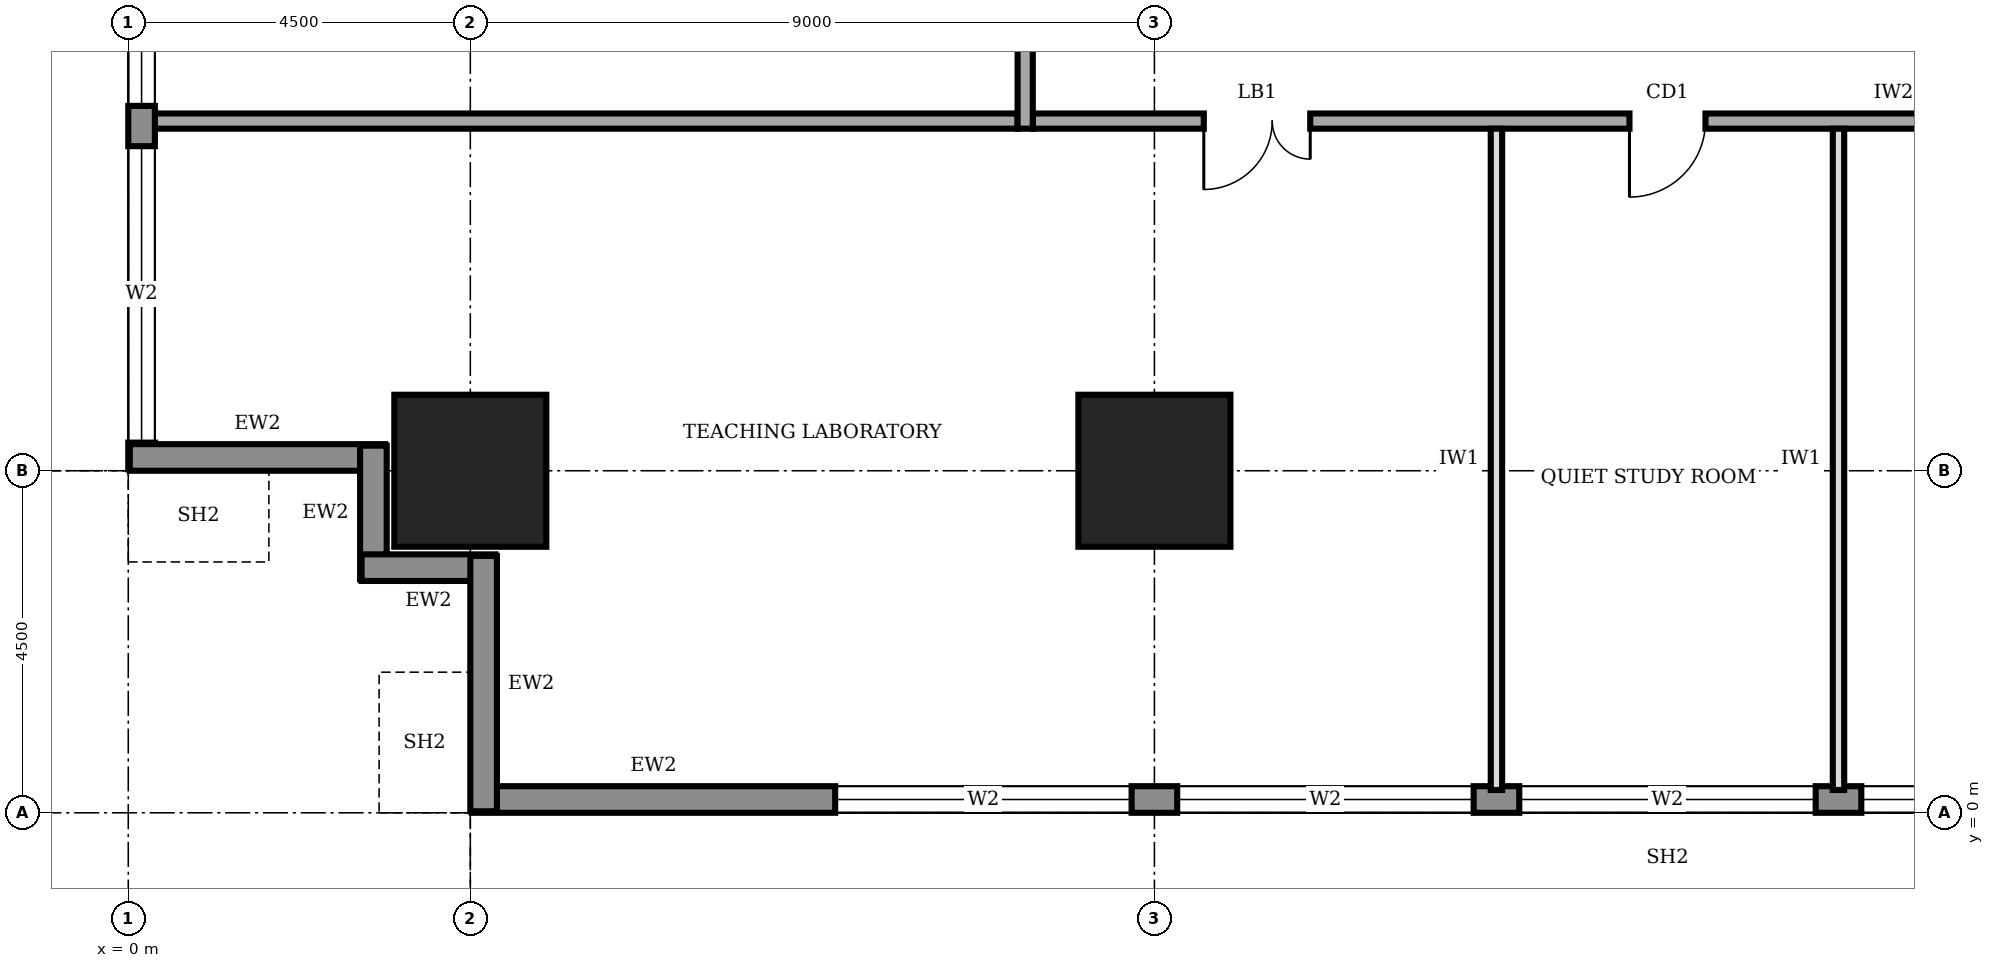
"""IFC4 building model, lengths in metres.
Left out: names, types, materials, properties, quantities, classifications, styles, units other than length and angle.
Written with IfcOpenShell. Run it as: python <this file> out.ifc"""

import sys

from ifc_helpers import new_model, si_unit, direction, frame, frame_2d, origin, origin_2d, place, context, subcontext, project, spatial, rectangle, extrude, element, fill, save


model = new_model("IFC4")
c1 = context("Model", 3, precision=1e-05, world=origin(), true_north=direction((0.0, 1.0)))
c2 = subcontext(c1, "Body", "Model", "MODEL_VIEW")
j1 = project(units=[si_unit("LENGTHUNIT", "METRE"), si_unit("PLANEANGLEUNIT", "RADIAN")], contexts=[c1])
p1 = place(None, origin())
s1 = spatial("IfcSite", under=j1, at=p1, CompositionType="ELEMENT")
p2 = place(p1, origin())
s2 = spatial("IfcBuilding", under=s1, at=p2, CompositionType="ELEMENT")
p3 = place(p2, frame((0.0, 0.0, 69.0)))
s3 = spatial("IfcBuildingStorey", under=s2, at=p3, CompositionType="ELEMENT", Elevation=69.0)
for number, where, z_axis, x_axis in (
    (1, (4.5, 4.5, 0.0), (0.0, 0.0, 1.0), (1.0, 0.0, 0.0)),
    (2, (13.5, 4.5, 0.0), (0.0, 0.0, 1.0), (1.0, 0.0, 0.0)),
):
    element("IfcColumn", number, at=place(p3, frame(where, z_axis=z_axis, x_axis=x_axis)), inside=s3, PredefinedType="COLUMN", context=c2, shape_type="SweptSolid", body=[
        extrude(rectangle(XDim=2.0, YDim=2.0, at=origin_2d()), origin(), (0.0, 0.0, 1.0), 4.0),
    ])
p4 = place(p3, frame((4.52, 0.175, 0.0), z_axis=(0.0, 0.0, 1.0), x_axis=(1.0, 0.0, 0.0)))
e3 = element("IfcWall", 3, at=p4, inside=s3, PredefinedType="STANDARD", context=c2, shape_type="SweptSolid", body=[
    extrude(rectangle(XDim=31.46, YDim=0.35, at=frame_2d((15.73, 0.0))), origin(), (0.0, 0.0, 1.0), 3.75),
])
p5 = place(p4, frame((4.78, 0.0, 0.6)))
e4 = element("IfcOpeningElement", 4, at=p5, cuts=e3, PredefinedType="OPENING", context=c2, shape_type="SweptSolid", body=[
    extrude(rectangle(XDim=3.9, YDim=2.6, at=frame_2d((1.95, 1.3))), frame((0.0, 0.185, 0.0), z_axis=(0.0, -1.0, 0.0), x_axis=(1.0, 0.0, 0.0)), (0.0, 0.0, 1.0), 0.37),
])
p6 = place(p4, frame((9.28, 0.0, 0.6)))
e5 = element("IfcOpeningElement", 5, at=p6, cuts=e3, PredefinedType="OPENING", context=c2, shape_type="SweptSolid", body=[
    extrude(rectangle(XDim=3.9, YDim=2.6, at=frame_2d((1.95, 1.3))), frame((0.0, 0.185, 0.0), z_axis=(0.0, -1.0, 0.0), x_axis=(1.0, 0.0, 0.0)), (0.0, 0.0, 1.0), 0.37),
])
p7 = place(p4, frame((13.78, 0.0, 0.6)))
e6 = element("IfcOpeningElement", 6, at=p7, cuts=e3, PredefinedType="OPENING", context=c2, shape_type="SweptSolid", body=[
    extrude(rectangle(XDim=3.9, YDim=2.6, at=frame_2d((1.95, 1.3))), frame((0.0, 0.185, 0.0), z_axis=(0.0, -1.0, 0.0), x_axis=(1.0, 0.0, 0.0)), (0.0, 0.0, 1.0), 0.37),
])
p8 = place(p4, frame((18.28, 0.0, 0.6)))
e7 = element("IfcOpeningElement", 7, at=p8, cuts=e3, PredefinedType="OPENING", context=c2, shape_type="SweptSolid", body=[
    extrude(rectangle(XDim=3.9, YDim=2.6, at=frame_2d((1.95, 1.3))), frame((0.0, 0.185, 0.0), z_axis=(0.0, -1.0, 0.0), x_axis=(1.0, 0.0, 0.0)), (0.0, 0.0, 1.0), 0.37),
])
p9 = place(p4, frame((22.78, 0.0, 0.6)))
e8 = element("IfcOpeningElement", 8, at=p9, cuts=e3, PredefinedType="OPENING", context=c2, shape_type="SweptSolid", body=[
    extrude(rectangle(XDim=3.9, YDim=2.6, at=frame_2d((1.95, 1.3))), frame((0.0, 0.185, 0.0), z_axis=(0.0, -1.0, 0.0), x_axis=(1.0, 0.0, 0.0)), (0.0, 0.0, 1.0), 0.37),
])
p10 = place(p4, frame((27.21, 0.0, 0.6)))
e9 = element("IfcOpeningElement", 9, at=p10, cuts=e3, PredefinedType="OPENING", context=c2, shape_type="SweptSolid", body=[
    extrude(rectangle(XDim=3.9, YDim=2.6, at=frame_2d((1.95, 1.3))), frame((0.0, 0.185, 0.0), z_axis=(0.0, -1.0, 0.0), x_axis=(1.0, 0.0, 0.0)), (0.0, 0.0, 1.0), 0.37),
])
p11 = place(p3, frame((0.175, 35.98, 0.0), z_axis=(0.0, 0.0, 1.0), x_axis=(0.0, -1.0, 0.0)))
e10 = element("IfcWall", 10, at=p11, inside=s3, PredefinedType="STANDARD", context=c2, shape_type="SweptSolid", body=[
    extrude(rectangle(XDim=31.46, YDim=0.35, at=frame_2d((15.73, 0.0))), origin(), (0.0, 0.0, 1.0), 3.75),
])
p12 = place(p11, frame((27.21, 0.0, 0.6)))
e11 = element("IfcOpeningElement", 11, at=p12, cuts=e10, PredefinedType="OPENING", context=c2, shape_type="SweptSolid", body=[
    extrude(rectangle(XDim=3.9, YDim=2.6, at=frame_2d((1.95, 1.3))), frame((0.0, 0.185, 0.0), z_axis=(0.0, -1.0, 0.0), x_axis=(1.0, 0.0, 0.0)), (0.0, 0.0, 1.0), 0.37),
])
p13 = place(p11, frame((22.78, 0.0, 0.6)))
e12 = element("IfcOpeningElement", 12, at=p13, cuts=e10, PredefinedType="OPENING", context=c2, shape_type="SweptSolid", body=[
    extrude(rectangle(XDim=3.9, YDim=2.6, at=frame_2d((1.95, 1.3))), frame((0.0, 0.185, 0.0), z_axis=(0.0, -1.0, 0.0), x_axis=(1.0, 0.0, 0.0)), (0.0, 0.0, 1.0), 0.37),
])
p14 = place(p11, frame((18.28, 0.0, 0.6)))
e13 = element("IfcOpeningElement", 13, at=p14, cuts=e10, PredefinedType="OPENING", context=c2, shape_type="SweptSolid", body=[
    extrude(rectangle(XDim=3.9, YDim=2.6, at=frame_2d((1.95, 1.3))), frame((0.0, 0.185, 0.0), z_axis=(0.0, -1.0, 0.0), x_axis=(1.0, 0.0, 0.0)), (0.0, 0.0, 1.0), 0.37),
])
p15 = place(p11, frame((13.78, 0.0, 0.6)))
e14 = element("IfcOpeningElement", 14, at=p15, cuts=e10, PredefinedType="OPENING", context=c2, shape_type="SweptSolid", body=[
    extrude(rectangle(XDim=3.9, YDim=2.6, at=frame_2d((1.95, 1.3))), frame((0.0, 0.185, 0.0), z_axis=(0.0, -1.0, 0.0), x_axis=(1.0, 0.0, 0.0)), (0.0, 0.0, 1.0), 0.37),
])
p16 = place(p11, frame((9.28, 0.0, 0.6)))
e15 = element("IfcOpeningElement", 15, at=p16, cuts=e10, PredefinedType="OPENING", context=c2, shape_type="SweptSolid", body=[
    extrude(rectangle(XDim=3.9, YDim=2.6, at=frame_2d((1.95, 1.3))), frame((0.0, 0.185, 0.0), z_axis=(0.0, -1.0, 0.0), x_axis=(1.0, 0.0, 0.0)), (0.0, 0.0, 1.0), 0.37),
])
p17 = place(p11, frame((4.78, 0.0, 0.6)))
e16 = element("IfcOpeningElement", 16, at=p17, cuts=e10, PredefinedType="OPENING", context=c2, shape_type="SweptSolid", body=[
    extrude(rectangle(XDim=3.9, YDim=2.6, at=frame_2d((1.95, 1.3))), frame((0.0, 0.185, 0.0), z_axis=(0.0, -1.0, 0.0), x_axis=(1.0, 0.0, 0.0)), (0.0, 0.0, 1.0), 0.37),
])
p18 = place(p3, frame((0.02, 4.675, 0.0), z_axis=(0.0, 0.0, 1.0), x_axis=(1.0, 0.0, 0.0)))
e17 = element("IfcWall", 17, at=p18, inside=s3, PredefinedType="STANDARD", context=c2, shape_type="SweptSolid", body=[
    extrude(rectangle(XDim=3.36, YDim=0.35, at=frame_2d((1.68, 0.0))), origin(), (0.0, 0.0, 1.0), 2.85),
])
for number, where, z_axis, x_axis in (
    (18, (3.225, 4.83, 0.0), (0.0, 0.0, 1.0), (0.0, -1.0, 0.0)),
    (19, (3.07, 3.225, 0.0), (0.0, 0.0, 1.0), (1.0, 0.0, 0.0)),
):
    element("IfcWall", number, at=place(p3, frame(where, z_axis=z_axis, x_axis=x_axis)), inside=s3, PredefinedType="STANDARD", context=c2, shape_type="SweptSolid", body=[
        extrude(rectangle(XDim=1.76, YDim=0.35, at=frame_2d((0.88, 0.0))), origin(), (0.0, 0.0, 1.0), 3.75),
    ])
p19 = place(p3, frame((4.675, 3.38, 0.0), z_axis=(0.0, 0.0, 1.0), x_axis=(0.0, -1.0, 0.0)))
e20 = element("IfcWall", 20, at=p19, inside=s3, PredefinedType="STANDARD", context=c2, shape_type="SweptSolid", body=[
    extrude(rectangle(XDim=3.36, YDim=0.35, at=frame_2d((1.68, 0.0))), origin(), (0.0, 0.0, 1.0), 2.85),
])
p20 = place(p3, frame((11.9, 9.1, 0.0), z_axis=(0.0, 0.0, 1.0), x_axis=(1.0, 0.0, 0.0)))
e21 = element("IfcWall", 21, at=p20, inside=s3, PredefinedType="SOLIDWALL", context=c2, shape_type="SweptSolid", body=[
    extrude(rectangle(XDim=18.4, YDim=0.2, at=frame_2d((9.2, 0.0))), origin(), (0.0, 0.0, 1.0), 3.75),
])
p21 = place(p20, frame((2.25, 0.0, 0.0)))
e22 = element("IfcOpeningElement", 22, at=p21, cuts=e21, PredefinedType="OPENING", context=c2, shape_type="SweptSolid", body=[
    extrude(rectangle(XDim=1.4, YDim=2.1, at=frame_2d((0.7, 1.05))), frame((0.0, 0.11, 0.0), z_axis=(0.0, -1.0, 0.0), x_axis=(1.0, 0.0, 0.0)), (0.0, 0.0, 1.0), 0.22),
])
p22 = place(p20, frame((7.85, 0.0, 0.0)))
e23 = element("IfcOpeningElement", 23, at=p22, cuts=e21, PredefinedType="OPENING", context=c2, shape_type="SweptSolid", body=[
    extrude(rectangle(XDim=1.0, YDim=2.1, at=frame_2d((0.5, 1.05))), frame((0.0, 0.11, 0.0), z_axis=(0.0, -1.0, 0.0), x_axis=(1.0, 0.0, 0.0)), (0.0, 0.0, 1.0), 0.22),
])
p23 = place(p20, frame((13.8, 0.0, 0.0)))
e24 = element("IfcOpeningElement", 24, at=p23, cuts=e21, PredefinedType="OPENING", context=c2, shape_type="SweptSolid", body=[
    extrude(rectangle(XDim=1.4, YDim=2.1, at=frame_2d((0.7, 1.05))), frame((0.0, 0.11, 0.0), z_axis=(0.0, -1.0, 0.0), x_axis=(1.0, 0.0, 0.0)), (0.0, 0.0, 1.0), 0.22),
])
p24 = place(p3, frame((11.8, 31.3, 0.0), z_axis=(0.0, 0.0, 1.0), x_axis=(0.0, -1.0, 0.0)))
e25 = element("IfcWall", 25, at=p24, inside=s3, PredefinedType="SOLIDWALL", context=c2, shape_type="SweptSolid", body=[
    extrude(rectangle(XDim=22.3, YDim=0.2, at=frame_2d((11.15, 0.0))), origin(), (0.0, 0.0, 1.0), 3.75),
])
p25 = place(p24, frame((19.55, 0.0, 0.0)))
e26 = element("IfcOpeningElement", 26, at=p25, cuts=e25, PredefinedType="OPENING", context=c2, shape_type="SweptSolid", body=[
    extrude(rectangle(XDim=1.0, YDim=2.1, at=frame_2d((0.5, 1.05))), frame((0.0, 0.11, 0.0), z_axis=(0.0, -1.0, 0.0), x_axis=(1.0, 0.0, 0.0)), (0.0, 0.0, 1.0), 0.22),
])
p26 = place(p24, frame((15.45, 0.0, 0.0)))
e27 = element("IfcOpeningElement", 27, at=p26, cuts=e25, PredefinedType="OPENING", context=c2, shape_type="SweptSolid", body=[
    extrude(rectangle(XDim=0.9, YDim=2.1, at=frame_2d((0.45, 1.05))), frame((0.0, 0.11, 0.0), z_axis=(0.0, -1.0, 0.0), x_axis=(1.0, 0.0, 0.0)), (0.0, 0.0, 1.0), 0.22),
])
p27 = place(p24, frame((12.45, 0.0, 0.0)))
e28 = element("IfcOpeningElement", 28, at=p27, cuts=e25, PredefinedType="OPENING", context=c2, shape_type="SweptSolid", body=[
    extrude(rectangle(XDim=0.9, YDim=2.1, at=frame_2d((0.45, 1.05))), frame((0.0, 0.11, 0.0), z_axis=(0.0, -1.0, 0.0), x_axis=(1.0, 0.0, 0.0)), (0.0, 0.0, 1.0), 0.22),
])
p28 = place(p24, frame((7.6, 0.0, 0.0)))
e29 = element("IfcOpeningElement", 29, at=p28, cuts=e25, PredefinedType="OPENING", context=c2, shape_type="SweptSolid", body=[
    extrude(rectangle(XDim=0.9, YDim=2.1, at=frame_2d((0.45, 1.05))), frame((0.0, 0.11, 0.0), z_axis=(0.0, -1.0, 0.0), x_axis=(1.0, 0.0, 0.0)), (0.0, 0.0, 1.0), 0.22),
])
p29 = place(p24, frame((4.8, 0.0, 0.0)))
e30 = element("IfcOpeningElement", 30, at=p29, cuts=e25, PredefinedType="OPENING", context=c2, shape_type="SweptSolid", body=[
    extrude(rectangle(XDim=1.0, YDim=2.1, at=frame_2d((0.5, 1.05))), frame((0.0, 0.11, 0.0), z_axis=(0.0, -1.0, 0.0), x_axis=(1.0, 0.0, 0.0)), (0.0, 0.0, 1.0), 0.22),
])
p30 = place(p24, frame((10.3, 0.0, 0.0)))
e31 = element("IfcOpeningElement", 31, at=p30, cuts=e25, PredefinedType="OPENING", context=c2, shape_type="SweptSolid", body=[
    extrude(rectangle(XDim=1.0, YDim=2.1, at=frame_2d((0.5, 1.05))), frame((0.0, 0.11, 0.0), z_axis=(0.0, -1.0, 0.0), x_axis=(1.0, 0.0, 0.0)), (0.0, 0.0, 1.0), 0.22),
])
p31 = place(p24, frame((1.55, 0.0, 0.0)))
e32 = element("IfcOpeningElement", 32, at=p31, cuts=e25, PredefinedType="OPENING", context=c2, shape_type="SweptSolid", body=[
    extrude(rectangle(XDim=1.0, YDim=2.1, at=frame_2d((0.5, 1.05))), frame((0.0, 0.11, 0.0), z_axis=(0.0, -1.0, 0.0), x_axis=(1.0, 0.0, 0.0)), (0.0, 0.0, 1.0), 0.22),
])
p32 = place(p3, frame((0.3, 9.1, 0.0), z_axis=(0.0, 0.0, 1.0), x_axis=(1.0, 0.0, 0.0)))
e33 = element("IfcWall", 33, at=p32, inside=s3, PredefinedType="SOLIDWALL", context=c2, shape_type="SweptSolid", body=[
    extrude(rectangle(XDim=11.4, YDim=0.2, at=frame_2d((5.7, 0.0))), origin(), (0.0, 0.0, 1.0), 3.75),
])
for number, where, z_axis, x_axis in (
    (34, (18.0, 0.3, 0.0), (0.0, 0.0, 1.0), (0.0, 1.0, 0.0)),
    (35, (22.5, 0.3, 0.0), (0.0, 0.0, 1.0), (0.0, 1.0, 0.0)),
):
    element("IfcWall", number, at=place(p3, frame(where, z_axis=z_axis, x_axis=x_axis)), inside=s3, PredefinedType="PARTITIONING", context=c2, shape_type="SweptSolid", body=[
        extrude(rectangle(XDim=8.7, YDim=0.15, at=frame_2d((4.35, 0.0))), origin(), (0.0, 0.0, 1.0), 3.75),
    ])
p33 = place(p5, origin())
e36 = element("IfcWindow", 36, at=p33, inside=s3, PartitioningType="SINGLE_PANEL", PredefinedType="WINDOW", context=c2, shape_type="SweptSolid", body=[
    extrude(rectangle(XDim=3.9, YDim=2.6, at=frame_2d((1.95, 1.3))), frame((0.0, 0.03, 0.0), z_axis=(0.0, -1.0, 0.0), x_axis=(1.0, 0.0, 0.0)), (0.0, 0.0, 1.0), 0.06),
])
fill(e4, e36)
p34 = place(p6, origin())
e37 = element("IfcWindow", 37, at=p34, inside=s3, PartitioningType="SINGLE_PANEL", PredefinedType="WINDOW", context=c2, shape_type="SweptSolid", body=[
    extrude(rectangle(XDim=3.9, YDim=2.6, at=frame_2d((1.95, 1.3))), frame((0.0, 0.03, 0.0), z_axis=(0.0, -1.0, 0.0), x_axis=(1.0, 0.0, 0.0)), (0.0, 0.0, 1.0), 0.06),
])
fill(e5, e37)
p35 = place(p7, origin())
e38 = element("IfcWindow", 38, at=p35, inside=s3, PartitioningType="SINGLE_PANEL", PredefinedType="WINDOW", context=c2, shape_type="SweptSolid", body=[
    extrude(rectangle(XDim=3.9, YDim=2.6, at=frame_2d((1.95, 1.3))), frame((0.0, 0.03, 0.0), z_axis=(0.0, -1.0, 0.0), x_axis=(1.0, 0.0, 0.0)), (0.0, 0.0, 1.0), 0.06),
])
fill(e6, e38)
p36 = place(p8, origin())
e39 = element("IfcWindow", 39, at=p36, inside=s3, PartitioningType="SINGLE_PANEL", PredefinedType="WINDOW", context=c2, shape_type="SweptSolid", body=[
    extrude(rectangle(XDim=3.9, YDim=2.6, at=frame_2d((1.95, 1.3))), frame((0.0, 0.03, 0.0), z_axis=(0.0, -1.0, 0.0), x_axis=(1.0, 0.0, 0.0)), (0.0, 0.0, 1.0), 0.06),
])
fill(e7, e39)
p37 = place(p12, origin())
e40 = element("IfcWindow", 40, at=p37, inside=s3, PartitioningType="SINGLE_PANEL", PredefinedType="WINDOW", context=c2, shape_type="SweptSolid", body=[
    extrude(rectangle(XDim=3.9, YDim=2.6, at=frame_2d((1.95, 1.3))), frame((0.0, 0.03, 0.0), z_axis=(0.0, -1.0, 0.0), x_axis=(1.0, 0.0, 0.0)), (0.0, 0.0, 1.0), 0.06),
])
fill(e11, e40)
p38 = place(p13, origin())
e41 = element("IfcWindow", 41, at=p38, inside=s3, PartitioningType="SINGLE_PANEL", PredefinedType="WINDOW", context=c2, shape_type="SweptSolid", body=[
    extrude(rectangle(XDim=3.9, YDim=2.6, at=frame_2d((1.95, 1.3))), frame((0.0, 0.03, 0.0), z_axis=(0.0, -1.0, 0.0), x_axis=(1.0, 0.0, 0.0)), (0.0, 0.0, 1.0), 0.06),
])
fill(e12, e41)
p39 = place(p21, frame((1.4, 0.0, 0.0), z_axis=(0.0, 0.0, 1.0), x_axis=(-1.0, 0.0, 0.0)))
e42 = element("IfcDoor", 42, at=p39, inside=s3, OperationType="DOUBLE_DOOR_SINGLE_SWING", PredefinedType="DOOR", context=c2, shape_type="SweptSolid", body=[
    extrude(rectangle(XDim=1.4, YDim=2.1, at=frame_2d((0.7, 1.05))), frame((0.0, 0.025, 0.0), z_axis=(0.0, -1.0, 0.0), x_axis=(1.0, 0.0, 0.0)), (0.0, 0.0, 1.0), 0.05),
])
fill(e22, e42)
p40 = place(p22, frame((1.0, 0.0, 0.0), z_axis=(0.0, 0.0, 1.0), x_axis=(-1.0, 0.0, 0.0)))
e43 = element("IfcDoor", 43, at=p40, inside=s3, OperationType="SINGLE_SWING_RIGHT", PredefinedType="DOOR", context=c2, shape_type="SweptSolid", body=[
    extrude(rectangle(XDim=1.0, YDim=2.1, at=frame_2d((0.5, 1.05))), frame((0.0, 0.025, 0.0), z_axis=(0.0, -1.0, 0.0), x_axis=(1.0, 0.0, 0.0)), (0.0, 0.0, 1.0), 0.05),
])
fill(e23, e43)
save(model, sys.argv[1])
